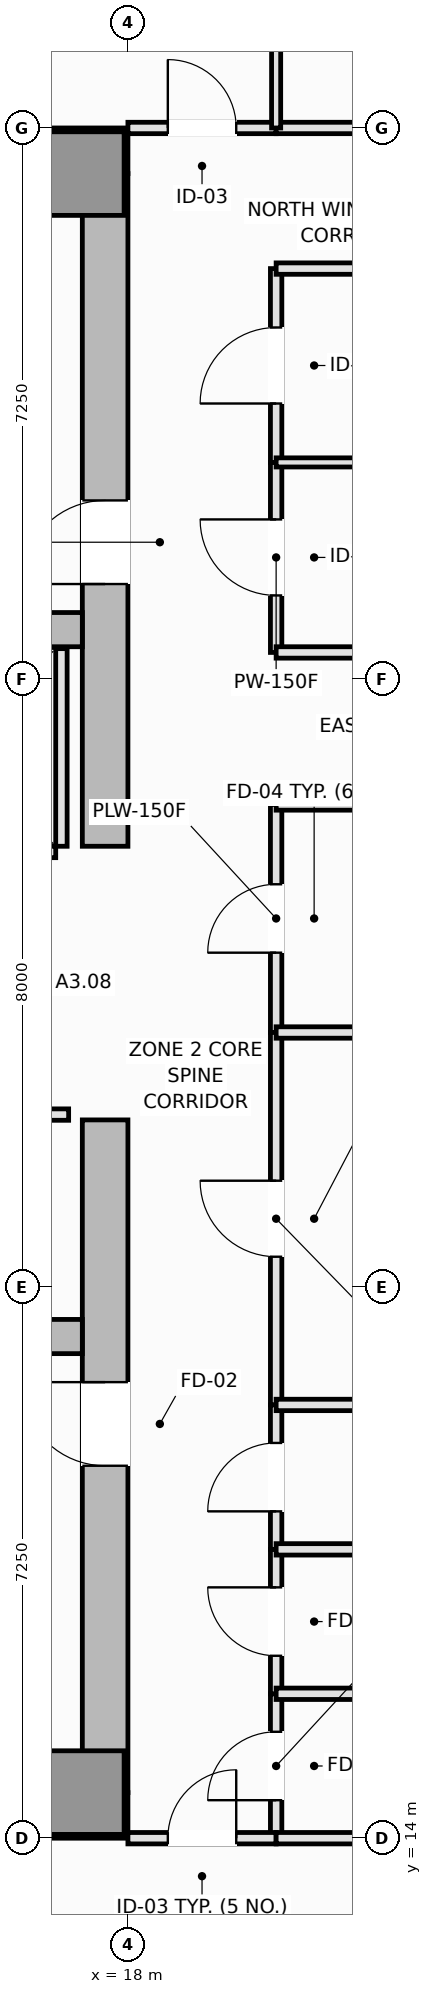
"""IFC4 building model, lengths in metres.
Left out: names, types, materials, properties, quantities, classifications, styles, units other than length and angle.
Written with IfcOpenShell. Run it as: python <this file> out.ifc"""

import sys

from ifc_helpers import new_model, si_unit, direction, frame, frame_2d, origin, origin_2d, place, context, subcontext, project, spatial, rectangle, extrude, element, fill, save


model = new_model("IFC4")
c1 = context("Model", 3, precision=1e-05, world=origin(), true_north=direction((0.0, 1.0)))
c2 = subcontext(c1, "Body", "Model", "MODEL_VIEW")
j1 = project(units=[si_unit("LENGTHUNIT", "METRE"), si_unit("PLANEANGLEUNIT", "RADIAN")], contexts=[c1])
p1 = place(None, origin())
s1 = spatial("IfcSite", under=j1, at=p1, CompositionType="ELEMENT")
p2 = place(p1, origin())
s2 = spatial("IfcBuilding", under=s1, at=p2, CompositionType="ELEMENT")
p3 = place(p2, frame((0.0, 0.0, 159.05)))
s3 = spatial("IfcBuildingStorey", under=s2, at=p3, CompositionType="ELEMENT", Elevation=159.05)
for number, where, z_axis, x_axis in (
    (1, (4.5, 14.3, 0.0), (0.0, 0.0, 1.0), (1.0, 0.0, 0.0)),
    (2, (4.5, 36.2, 0.0), (0.0, 0.0, 1.0), (1.0, 0.0, 0.0)),
):
    element("IfcWall", number, at=place(p3, frame(where, z_axis=z_axis, x_axis=x_axis)), inside=s3, PredefinedType="SHEAR", context=c2, shape_type="SweptSolid", body=[
        extrude(rectangle(XDim=13.5, YDim=0.6, at=frame_2d((6.75, 0.0))), origin(), (0.0, 0.0, 1.0), 3.55),
    ])
p4 = place(p3, frame((17.7, 14.6, 0.0), z_axis=(0.0, 0.0, 1.0), x_axis=(0.0, 1.0, 0.0)))
e3 = element("IfcWall", 3, at=p4, inside=s3, PredefinedType="SHEAR", context=c2, shape_type="SweptSolid", body=[
    extrude(rectangle(XDim=8.85, YDim=0.6, at=frame_2d((4.425, 0.0))), origin(), (0.0, 0.0, 1.0), 3.55),
])
p5 = place(p4, frame((4.3, 0.0, 0.0)))
e4 = element("IfcOpeningElement", 4, at=p5, cuts=e3, PredefinedType="OPENING", context=c2, shape_type="SweptSolid", body=[
    extrude(rectangle(XDim=1.1, YDim=2.15, at=frame_2d((0.55, 1.075))), frame((0.0, 0.31, 0.0), z_axis=(0.0, -1.0, 0.0), x_axis=(1.0, 0.0, 0.0)), (0.0, 0.0, 1.0), 0.62),
])
p6 = place(p3, frame((17.7, 27.05, 0.0), z_axis=(0.0, 0.0, 1.0), x_axis=(0.0, 1.0, 0.0)))
e5 = element("IfcWall", 5, at=p6, inside=s3, PredefinedType="SHEAR", context=c2, shape_type="SweptSolid", body=[
    extrude(rectangle(XDim=8.85, YDim=0.6, at=frame_2d((4.425, 0.0))), origin(), (0.0, 0.0, 1.0), 3.55),
])
p7 = place(p6, frame((3.45, 0.0, 0.0)))
e6 = element("IfcOpeningElement", 6, at=p7, cuts=e5, PredefinedType="OPENING", context=c2, shape_type="SweptSolid", body=[
    extrude(rectangle(XDim=1.1, YDim=2.15, at=frame_2d((0.55, 1.075))), frame((0.0, 0.31, 0.0), z_axis=(0.0, -1.0, 0.0), x_axis=(1.0, 0.0, 0.0)), (0.0, 0.0, 1.0), 0.62),
])
for number, where, z_axis, x_axis in (
    (7, (5.1, 20.6, 0.0), (0.0, 0.0, 1.0), (1.0, 0.0, 0.0)),
    (8, (5.1, 29.9, 0.0), (0.0, 0.0, 1.0), (1.0, 0.0, 0.0)),
):
    element("IfcWall", number, at=place(p3, frame(where, z_axis=z_axis, x_axis=x_axis)), inside=s3, PredefinedType="SHEAR", context=c2, shape_type="SweptSolid", body=[
        extrude(rectangle(XDim=12.3, YDim=0.45, at=frame_2d((6.15, 0.0))), origin(), (0.0, 0.0, 1.0), 3.55),
    ])
for number, where, z_axis, x_axis in (
    (9, (17.4, 14.6, 0.0), (0.0, 0.0, 1.0), (1.0, 0.0, 0.0)),
    (10, (17.4, 35.9, 0.0), (0.0, 0.0, 1.0), (1.0, 0.0, 0.0)),
):
    element("IfcColumn", number, at=place(p3, frame(where, z_axis=z_axis, x_axis=x_axis)), inside=s3, PredefinedType="PILASTER", context=c2, shape_type="SweptSolid", body=[
        extrude(rectangle(XDim=1.1, YDim=1.1, at=origin_2d()), origin(), (0.0, 0.0, 1.0), 3.55),
    ])
p8 = place(p3, frame((14.5, 26.975, 0.0), z_axis=(0.0, 0.0, 1.0), x_axis=(1.0, 0.0, 0.0)))
e11 = element("IfcWall", 11, at=p8, inside=s3, PredefinedType="PARTITIONING", context=c2, shape_type="SweptSolid", body=[
    extrude(rectangle(XDim=2.55, YDim=0.15, at=frame_2d((1.275, 0.0))), origin(), (0.0, 0.0, 1.0), 3.37),
])
p9 = place(p8, frame((0.625, 0.0, 0.0)))
e12 = element("IfcOpeningElement", 12, at=p9, cuts=e11, PredefinedType="OPENING", context=c2, shape_type="SweptSolid", body=[
    extrude(rectangle(XDim=1.3, YDim=2.2, at=frame_2d((0.65, 1.1))), frame((0.0, 0.085, 0.0), z_axis=(0.0, -1.0, 0.0), x_axis=(1.0, 0.0, 0.0)), (0.0, 0.0, 1.0), 0.17),
])
p10 = place(p3, frame((17.125, 27.05, 0.0), z_axis=(0.0, 0.0, 1.0), x_axis=(0.0, 1.0, 0.0)))
e13 = element("IfcWall", 13, at=p10, inside=s3, PredefinedType="PARTITIONING", context=c2, shape_type="SweptSolid", body=[
    extrude(rectangle(XDim=2.6, YDim=0.15, at=frame_2d((1.3, 0.0))), origin(), (0.0, 0.0, 1.0), 3.37),
])
p11 = place(p3, frame((14.33, 23.52, 0.0), z_axis=(0.0, 0.0, 1.0), x_axis=(1.0, 0.0, 0.0)))
e14 = element("IfcWall", 14, at=p11, inside=s3, PredefinedType="PARTITIONING", context=c2, shape_type="SweptSolid", body=[
    extrude(rectangle(XDim=2.89, YDim=0.15, at=frame_2d((1.445, 0.0))), origin(), (0.0, 0.0, 1.0), 3.37),
])
p12 = place(p11, frame((0.28, 0.0, 0.0)))
e15 = element("IfcOpeningElement", 15, at=p12, cuts=e14, PredefinedType="OPENING", context=c2, shape_type="SweptSolid", body=[
    extrude(rectangle(XDim=0.9, YDim=2.1, at=frame_2d((0.45, 1.05))), frame((0.0, 0.085, 0.0), z_axis=(0.0, -1.0, 0.0), x_axis=(1.0, 0.0, 0.0)), (0.0, 0.0, 1.0), 0.17),
])
p13 = place(p11, frame((1.71, 0.0, 0.0)))
e16 = element("IfcOpeningElement", 16, at=p13, cuts=e14, PredefinedType="OPENING", context=c2, shape_type="SweptSolid", body=[
    extrude(rectangle(XDim=0.9, YDim=2.1, at=frame_2d((0.45, 1.05))), frame((0.0, 0.085, 0.0), z_axis=(0.0, -1.0, 0.0), x_axis=(1.0, 0.0, 0.0)), (0.0, 0.0, 1.0), 0.17),
])
p14 = place(p3, frame((19.95, 24.6, 0.0), z_axis=(0.0, 0.0, 1.0), x_axis=(0.0, 1.0, 0.0)))
e17 = element("IfcWall", 17, at=p14, inside=s3, PredefinedType="PLUMBINGWALL", context=c2, shape_type="SweptSolid", body=[
    extrude(rectangle(XDim=3.0, YDim=0.15, at=frame_2d((1.5, 0.0))), origin(), (0.0, 0.0, 1.0), 3.37),
])
p15 = place(p14, frame((1.05, 0.0, 0.0)))
e18 = element("IfcOpeningElement", 18, at=p15, cuts=e17, PredefinedType="OPENING", context=c2, shape_type="SweptSolid", body=[
    extrude(rectangle(XDim=0.9, YDim=2.1, at=frame_2d((0.45, 1.05))), frame((0.0, 0.085, 0.0), z_axis=(0.0, -1.0, 0.0), x_axis=(1.0, 0.0, 0.0)), (0.0, 0.0, 1.0), 0.17),
])
p16 = place(p3, frame((19.95, 19.7, 0.0), z_axis=(0.0, 0.0, 1.0), x_axis=(0.0, 1.0, 0.0)))
e19 = element("IfcWall", 19, at=p16, inside=s3, PredefinedType="PARTITIONING", context=c2, shape_type="SweptSolid", body=[
    extrude(rectangle(XDim=4.9, YDim=0.15, at=frame_2d((2.45, 0.0))), origin(), (0.0, 0.0, 1.0), 3.37),
])
p17 = place(p16, frame((1.95, 0.0, 0.0)))
e20 = element("IfcOpeningElement", 20, at=p17, cuts=e19, PredefinedType="OPENING", context=c2, shape_type="SweptSolid", body=[
    extrude(rectangle(XDim=1.0, YDim=2.15, at=frame_2d((0.5, 1.075))), frame((0.0, 0.085, 0.0), z_axis=(0.0, -1.0, 0.0), x_axis=(1.0, 0.0, 0.0)), (0.0, 0.0, 1.0), 0.17),
])
p18 = place(p3, frame((19.95, 14.0, 0.0), z_axis=(0.0, 0.0, 1.0), x_axis=(0.0, 1.0, 0.0)))
e21 = element("IfcWall", 21, at=p18, inside=s3, PredefinedType="PLUMBINGWALL", context=c2, shape_type="SweptSolid", body=[
    extrude(rectangle(XDim=1.9, YDim=0.15, at=frame_2d((0.95, 0.0))), origin(), (0.0, 0.0, 1.0), 3.37),
])
p19 = place(p18, frame((0.5, 0.0, 0.0)))
e22 = element("IfcOpeningElement", 22, at=p19, cuts=e21, PredefinedType="OPENING", context=c2, shape_type="SweptSolid", body=[
    extrude(rectangle(XDim=0.9, YDim=2.1, at=frame_2d((0.45, 1.05))), frame((0.0, 0.085, 0.0), z_axis=(0.0, -1.0, 0.0), x_axis=(1.0, 0.0, 0.0)), (0.0, 0.0, 1.0), 0.17),
])
p20 = place(p3, frame((19.95, 15.9, 0.0), z_axis=(0.0, 0.0, 1.0), x_axis=(0.0, 1.0, 0.0)))
e23 = element("IfcWall", 23, at=p20, inside=s3, PredefinedType="PLUMBINGWALL", context=c2, shape_type="SweptSolid", body=[
    extrude(rectangle(XDim=1.9, YDim=0.15, at=frame_2d((0.95, 0.0))), origin(), (0.0, 0.0, 1.0), 3.37),
])
p21 = place(p20, frame((0.5, 0.0, 0.0)))
e24 = element("IfcOpeningElement", 24, at=p21, cuts=e23, PredefinedType="OPENING", context=c2, shape_type="SweptSolid", body=[
    extrude(rectangle(XDim=0.9, YDim=2.1, at=frame_2d((0.45, 1.05))), frame((0.0, 0.085, 0.0), z_axis=(0.0, -1.0, 0.0), x_axis=(1.0, 0.0, 0.0)), (0.0, 0.0, 1.0), 0.17),
])
p22 = place(p3, frame((19.95, 17.8, 0.0), z_axis=(0.0, 0.0, 1.0), x_axis=(0.0, 1.0, 0.0)))
e25 = element("IfcWall", 25, at=p22, inside=s3, PredefinedType="PLUMBINGWALL", context=c2, shape_type="SweptSolid", body=[
    extrude(rectangle(XDim=1.9, YDim=0.15, at=frame_2d((0.95, 0.0))), origin(), (0.0, 0.0, 1.0), 3.37),
])
p23 = place(p22, frame((0.5, 0.0, 0.0)))
e26 = element("IfcOpeningElement", 26, at=p23, cuts=e25, PredefinedType="OPENING", context=c2, shape_type="SweptSolid", body=[
    extrude(rectangle(XDim=0.9, YDim=2.1, at=frame_2d((0.45, 1.05))), frame((0.0, 0.085, 0.0), z_axis=(0.0, -1.0, 0.0), x_axis=(1.0, 0.0, 0.0)), (0.0, 0.0, 1.0), 0.17),
])
p24 = place(p3, frame((19.95, 29.6, 0.0), z_axis=(0.0, 0.0, 1.0), x_axis=(0.0, 1.0, 0.0)))
e27 = element("IfcWall", 27, at=p24, inside=s3, PredefinedType="PARTITIONING", context=c2, shape_type="SweptSolid", body=[
    extrude(rectangle(XDim=2.5, YDim=0.15, at=frame_2d((1.25, 0.0))), origin(), (0.0, 0.0, 1.0), 3.37),
])
p25 = place(p24, frame((0.75, 0.0, 0.0)))
e28 = element("IfcOpeningElement", 28, at=p25, cuts=e27, PredefinedType="OPENING", context=c2, shape_type="SweptSolid", body=[
    extrude(rectangle(XDim=1.0, YDim=2.15, at=frame_2d((0.5, 1.075))), frame((0.0, 0.085, 0.0), z_axis=(0.0, -1.0, 0.0), x_axis=(1.0, 0.0, 0.0)), (0.0, 0.0, 1.0), 0.17),
])
p26 = place(p3, frame((19.95, 32.1, 0.0), z_axis=(0.0, 0.0, 1.0), x_axis=(0.0, 1.0, 0.0)))
e29 = element("IfcWall", 29, at=p26, inside=s3, PredefinedType="PARTITIONING", context=c2, shape_type="SweptSolid", body=[
    extrude(rectangle(XDim=2.55, YDim=0.15, at=frame_2d((1.275, 0.0))), origin(), (0.0, 0.0, 1.0), 3.37),
])
p27 = place(p26, frame((0.775, 0.0, 0.0)))
e30 = element("IfcOpeningElement", 30, at=p27, cuts=e29, PredefinedType="OPENING", context=c2, shape_type="SweptSolid", body=[
    extrude(rectangle(XDim=1.0, YDim=2.15, at=frame_2d((0.5, 1.075))), frame((0.0, 0.085, 0.0), z_axis=(0.0, -1.0, 0.0), x_axis=(1.0, 0.0, 0.0)), (0.0, 0.0, 1.0), 0.17),
])
p28 = place(p3, frame((18.0, 14.0, 0.0), z_axis=(0.0, 0.0, 1.0), x_axis=(1.0, 0.0, 0.0)))
e31 = element("IfcWall", 31, at=p28, inside=s3, PredefinedType="PARTITIONING", context=c2, shape_type="SweptSolid", body=[
    extrude(rectangle(XDim=1.95, YDim=0.15, at=frame_2d((0.975, 0.0))), origin(), (0.0, 0.0, 1.0), 3.37),
])
p29 = place(p28, frame((0.525, 0.0, 0.0)))
e32 = element("IfcOpeningElement", 32, at=p29, cuts=e31, PredefinedType="OPENING", context=c2, shape_type="SweptSolid", body=[
    extrude(rectangle(XDim=0.9, YDim=2.1, at=frame_2d((0.45, 1.05))), frame((0.0, 0.085, 0.0), z_axis=(0.0, -1.0, 0.0), x_axis=(1.0, 0.0, 0.0)), (0.0, 0.0, 1.0), 0.17),
])
p30 = place(p3, frame((18.0, 36.5, 0.0), z_axis=(0.0, 0.0, 1.0), x_axis=(1.0, 0.0, 0.0)))
e33 = element("IfcWall", 33, at=p30, inside=s3, PredefinedType="PARTITIONING", context=c2, shape_type="SweptSolid", body=[
    extrude(rectangle(XDim=1.95, YDim=0.15, at=frame_2d((0.975, 0.0))), origin(), (0.0, 0.0, 1.0), 3.37),
])
p31 = place(p30, frame((0.525, 0.0, 0.0)))
e34 = element("IfcOpeningElement", 34, at=p31, cuts=e33, PredefinedType="OPENING", context=c2, shape_type="SweptSolid", body=[
    extrude(rectangle(XDim=0.9, YDim=2.1, at=frame_2d((0.45, 1.05))), frame((0.0, 0.085, 0.0), z_axis=(0.0, -1.0, 0.0), x_axis=(1.0, 0.0, 0.0)), (0.0, 0.0, 1.0), 0.17),
])
p32 = place(p3, frame((19.95, 27.6, 0.0), z_axis=(0.0, 0.0, 1.0), x_axis=(1.0, 0.0, 0.0)))
e35 = element("IfcWall", 35, at=p32, inside=s3, PredefinedType="PLUMBINGWALL", context=c2, shape_type="SweptSolid", body=[
    extrude(rectangle(XDim=3.25, YDim=0.15, at=frame_2d((1.625, 0.0))), origin(), (0.0, 0.0, 1.0), 3.37),
])
for number, where, z_axis, x_axis in (
    (36, (19.95, 29.6, 0.0), (0.0, 0.0, 1.0), (1.0, 0.0, 0.0)),
    (37, (19.95, 34.65, 0.0), (0.0, 0.0, 1.0), (1.0, 0.0, 0.0)),
):
    element("IfcWall", number, at=place(p3, frame(where, z_axis=z_axis, x_axis=x_axis)), inside=s3, PredefinedType="PARTITIONING", context=c2, shape_type="SweptSolid", body=[
        extrude(rectangle(XDim=7.55, YDim=0.15, at=frame_2d((3.775, 0.0))), origin(), (0.0, 0.0, 1.0), 3.37),
    ])
p33 = place(p3, frame((19.95, 36.5, 0.0), z_axis=(0.0, 0.0, 1.0), x_axis=(1.0, 0.0, 0.0)))
e38 = element("IfcWall", 38, at=p33, inside=s3, PredefinedType="PARTITIONING", context=c2, shape_type="SweptSolid", body=[
    extrude(rectangle(XDim=7.55, YDim=0.15, at=frame_2d((3.775, 0.0))), origin(), (0.0, 0.0, 1.0), 3.37),
])
p34 = place(p33, frame((3.275, 0.0, 0.0)))
e39 = element("IfcOpeningElement", 39, at=p34, cuts=e38, PredefinedType="OPENING", context=c2, shape_type="SweptSolid", body=[
    extrude(rectangle(XDim=1.0, YDim=2.15, at=frame_2d((0.5, 1.075))), frame((0.0, 0.085, 0.0), z_axis=(0.0, -1.0, 0.0), x_axis=(1.0, 0.0, 0.0)), (0.0, 0.0, 1.0), 0.17),
])
p35 = place(p3, frame((19.95, 24.6, 0.0), z_axis=(0.0, 0.0, 1.0), x_axis=(1.0, 0.0, 0.0)))
e40 = element("IfcWall", 40, at=p35, inside=s3, PredefinedType="PLUMBINGWALL", context=c2, shape_type="SweptSolid", body=[
    extrude(rectangle(XDim=3.25, YDim=0.15, at=frame_2d((1.625, 0.0))), origin(), (0.0, 0.0, 1.0), 3.37),
])
for number, where, z_axis, x_axis in (
    (41, (19.95, 19.7, 0.0), (0.0, 0.0, 1.0), (1.0, 0.0, 0.0)),
    (42, (19.95, 15.9, 0.0), (0.0, 0.0, 1.0), (1.0, 0.0, 0.0)),
    (43, (19.95, 14.0, 0.0), (0.0, 0.0, 1.0), (1.0, 0.0, 0.0)),
    (44, (19.95, 17.8, 0.0), (0.0, 0.0, 1.0), (1.0, 0.0, 0.0)),
):
    element("IfcWall", number, at=place(p3, frame(where, z_axis=z_axis, x_axis=x_axis)), inside=s3, PredefinedType="PLUMBINGWALL", context=c2, shape_type="SweptSolid", body=[
        extrude(rectangle(XDim=7.55, YDim=0.15, at=frame_2d((3.775, 0.0))), origin(), (0.0, 0.0, 1.0), 3.37),
    ])
p36 = place(p3, frame((19.95, 32.1, 0.0), z_axis=(0.0, 0.0, 1.0), x_axis=(1.0, 0.0, 0.0)))
e45 = element("IfcWall", 45, at=p36, inside=s3, PredefinedType="PARTITIONING", context=c2, shape_type="SweptSolid", body=[
    extrude(rectangle(XDim=7.55, YDim=0.12, at=frame_2d((3.775, 0.0))), origin(), (0.0, 0.0, 1.0), 2.77),
])
p37 = place(p3, frame((19.95, 36.5, 0.0), z_axis=(0.0, 0.0, 1.0), x_axis=(0.0, 1.0, 0.0)))
e46 = element("IfcWall", 46, at=p37, inside=s3, PredefinedType="PARTITIONING", context=c2, shape_type="SweptSolid", body=[
    extrude(rectangle(XDim=9.99, YDim=0.12, at=frame_2d((4.995, 0.0))), origin(), (0.0, 0.0, 1.0), 3.37),
])
p38 = place(p5, origin())
e47 = element("IfcDoor", 47, at=p38, inside=s3, OperationType="SINGLE_SWING_RIGHT", PredefinedType="DOOR", context=c2, shape_type="SweptSolid", body=[
    extrude(rectangle(XDim=1.1, YDim=2.15, at=frame_2d((0.55, 1.075))), frame((0.0, 0.025, 0.0), z_axis=(0.0, -1.0, 0.0), x_axis=(1.0, 0.0, 0.0)), (0.0, 0.0, 1.0), 0.05),
])
fill(e4, e47)
p39 = place(p7, origin())
e48 = element("IfcDoor", 48, at=p39, inside=s3, OperationType="SINGLE_SWING_LEFT", PredefinedType="DOOR", context=c2, shape_type="SweptSolid", body=[
    extrude(rectangle(XDim=1.1, YDim=2.15, at=frame_2d((0.55, 1.075))), frame((0.0, 0.025, 0.0), z_axis=(0.0, -1.0, 0.0), x_axis=(1.0, 0.0, 0.0)), (0.0, 0.0, 1.0), 0.05),
])
fill(e6, e48)
p40 = place(p15, origin())
e49 = element("IfcDoor", 49, at=p40, inside=s3, OperationType="SINGLE_SWING_LEFT", PredefinedType="DOOR", context=c2, shape_type="SweptSolid", body=[
    extrude(rectangle(XDim=0.9, YDim=2.1, at=frame_2d((0.45, 1.05))), frame((0.0, 0.025, 0.0), z_axis=(0.0, -1.0, 0.0), x_axis=(1.0, 0.0, 0.0)), (0.0, 0.0, 1.0), 0.05),
])
fill(e18, e49)
p41 = place(p17, origin())
e50 = element("IfcDoor", 50, at=p41, inside=s3, OperationType="SINGLE_SWING_RIGHT", PredefinedType="DOOR", context=c2, shape_type="SweptSolid", body=[
    extrude(rectangle(XDim=1.0, YDim=2.15, at=frame_2d((0.5, 1.075))), frame((0.0, 0.025, 0.0), z_axis=(0.0, -1.0, 0.0), x_axis=(1.0, 0.0, 0.0)), (0.0, 0.0, 1.0), 0.05),
])
fill(e20, e50)
p42 = place(p19, origin())
e51 = element("IfcDoor", 51, at=p42, inside=s3, OperationType="SINGLE_SWING_LEFT", PredefinedType="DOOR", context=c2, shape_type="SweptSolid", body=[
    extrude(rectangle(XDim=0.9, YDim=2.1, at=frame_2d((0.45, 1.05))), frame((0.0, 0.025, 0.0), z_axis=(0.0, -1.0, 0.0), x_axis=(1.0, 0.0, 0.0)), (0.0, 0.0, 1.0), 0.05),
])
fill(e22, e51)
p43 = place(p21, origin())
e52 = element("IfcDoor", 52, at=p43, inside=s3, OperationType="SINGLE_SWING_RIGHT", PredefinedType="DOOR", context=c2, shape_type="SweptSolid", body=[
    extrude(rectangle(XDim=0.9, YDim=2.1, at=frame_2d((0.45, 1.05))), frame((0.0, 0.025, 0.0), z_axis=(0.0, -1.0, 0.0), x_axis=(1.0, 0.0, 0.0)), (0.0, 0.0, 1.0), 0.05),
])
fill(e24, e52)
p44 = place(p23, origin())
e53 = element("IfcDoor", 53, at=p44, inside=s3, OperationType="SINGLE_SWING_LEFT", PredefinedType="DOOR", context=c2, shape_type="SweptSolid", body=[
    extrude(rectangle(XDim=0.9, YDim=2.1, at=frame_2d((0.45, 1.05))), frame((0.0, 0.025, 0.0), z_axis=(0.0, -1.0, 0.0), x_axis=(1.0, 0.0, 0.0)), (0.0, 0.0, 1.0), 0.05),
])
fill(e26, e53)
p45 = place(p25, origin())
e54 = element("IfcDoor", 54, at=p45, inside=s3, OperationType="SINGLE_SWING_RIGHT", PredefinedType="DOOR", context=c2, shape_type="SweptSolid", body=[
    extrude(rectangle(XDim=1.0, YDim=2.15, at=frame_2d((0.5, 1.075))), frame((0.0, 0.025, 0.0), z_axis=(0.0, -1.0, 0.0), x_axis=(1.0, 0.0, 0.0)), (0.0, 0.0, 1.0), 0.05),
])
fill(e28, e54)
p46 = place(p27, origin())
e55 = element("IfcDoor", 55, at=p46, inside=s3, OperationType="SINGLE_SWING_LEFT", PredefinedType="DOOR", context=c2, shape_type="SweptSolid", body=[
    extrude(rectangle(XDim=1.0, YDim=2.15, at=frame_2d((0.5, 1.075))), frame((0.0, 0.025, 0.0), z_axis=(0.0, -1.0, 0.0), x_axis=(1.0, 0.0, 0.0)), (0.0, 0.0, 1.0), 0.05),
])
fill(e30, e55)
p47 = place(p29, origin())
e56 = element("IfcDoor", 56, at=p47, inside=s3, OperationType="SINGLE_SWING_RIGHT", PredefinedType="DOOR", context=c2, shape_type="SweptSolid", body=[
    extrude(rectangle(XDim=0.9, YDim=2.1, at=frame_2d((0.45, 1.05))), frame((0.0, 0.025, 0.0), z_axis=(0.0, -1.0, 0.0), x_axis=(1.0, 0.0, 0.0)), (0.0, 0.0, 1.0), 0.05),
])
fill(e32, e56)
p48 = place(p31, origin())
e57 = element("IfcDoor", 57, at=p48, inside=s3, OperationType="SINGLE_SWING_LEFT", PredefinedType="DOOR", context=c2, shape_type="SweptSolid", body=[
    extrude(rectangle(XDim=0.9, YDim=2.1, at=frame_2d((0.45, 1.05))), frame((0.0, 0.025, 0.0), z_axis=(0.0, -1.0, 0.0), x_axis=(1.0, 0.0, 0.0)), (0.0, 0.0, 1.0), 0.05),
])
fill(e34, e57)
save(model, sys.argv[1])
